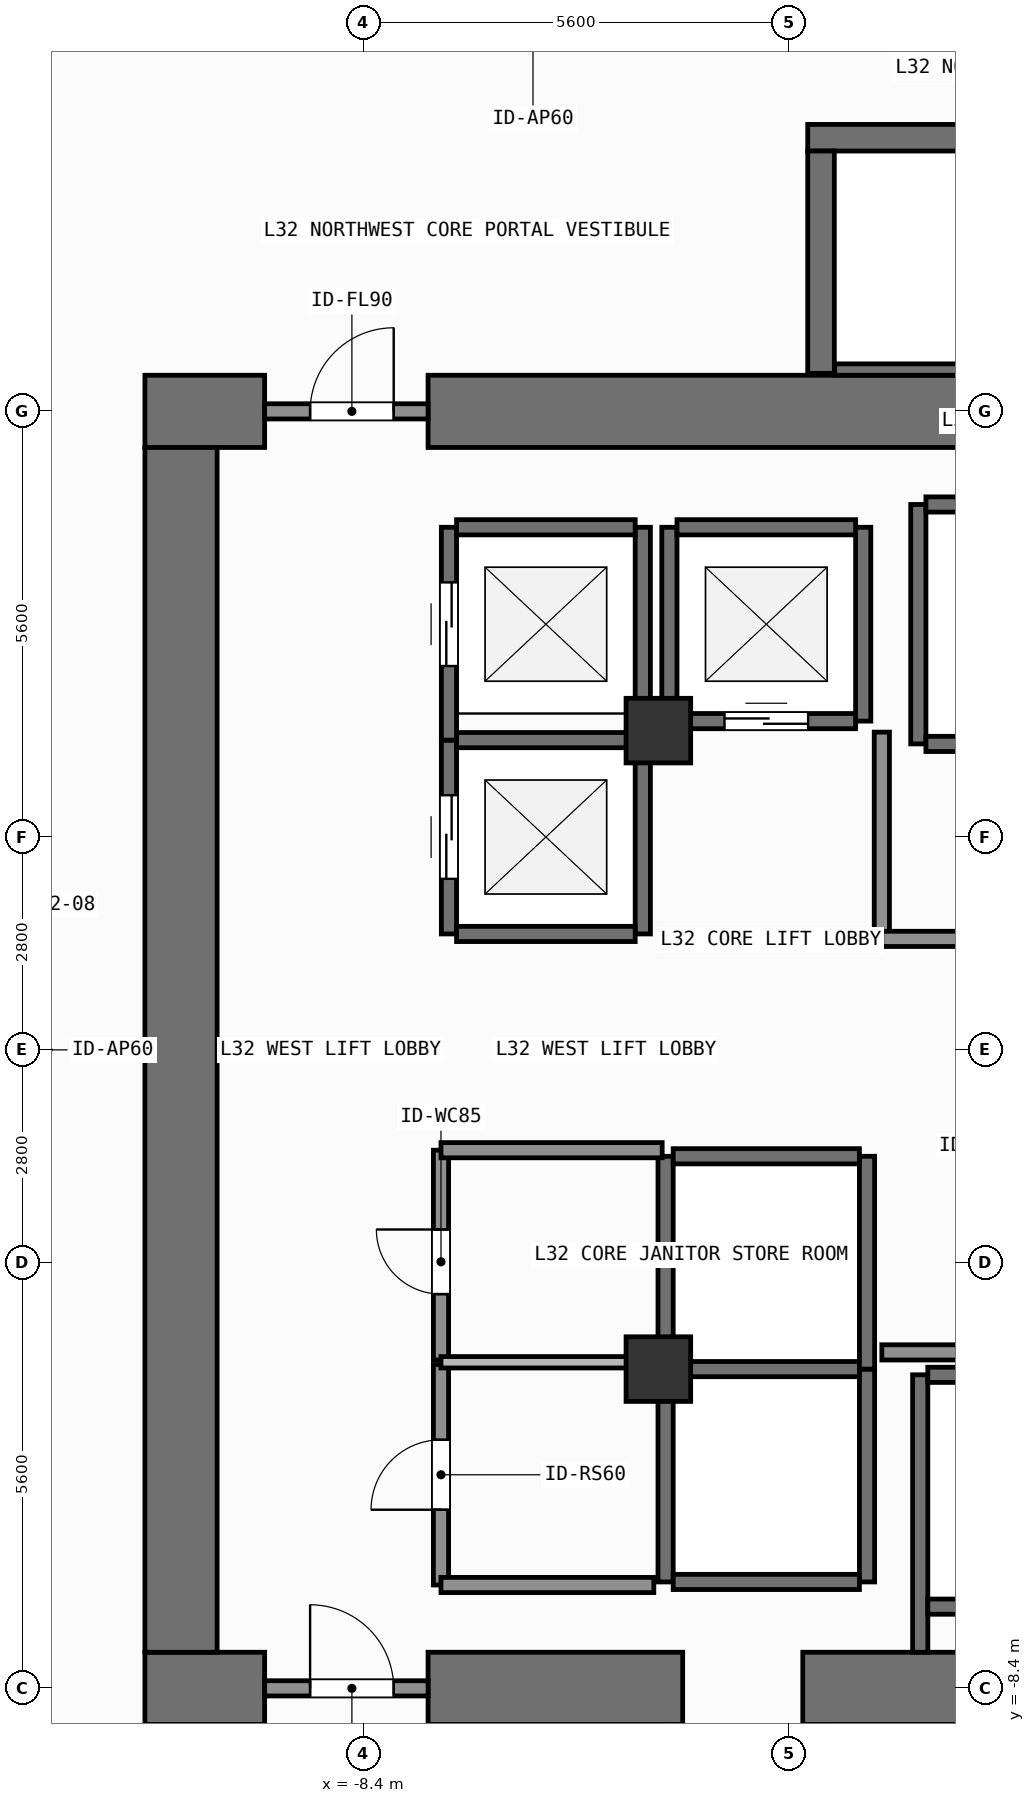
"""IFC4 building model, lengths in metres.
Left out: names, types, materials, properties, quantities, classifications, styles, units other than length and angle.
Written with IfcOpenShell. Run it as: python <this file> out.ifc"""

import sys

from ifc_helpers import new_model, si_unit, direction, frame, frame_2d, origin, origin_2d, place, context, subcontext, project, spatial, rectangle, extrude, element, fill, save


model = new_model("IFC4")
c1 = context("Model", 3, precision=1e-05, world=origin(), true_north=direction((0.0, 1.0)))
c2 = subcontext(c1, "Body", "Model", "MODEL_VIEW")
j1 = project(units=[si_unit("LENGTHUNIT", "METRE"), si_unit("PLANEANGLEUNIT", "RADIAN")], contexts=[c1])
p1 = place(None, origin())
s1 = spatial("IfcSite", under=j1, at=p1, CompositionType="ELEMENT")
p2 = place(p1, origin())
s2 = spatial("IfcBuilding", under=s1, at=p2, CompositionType="ELEMENT")
p3 = place(p2, frame((0.0, 0.0, 129.0)))
s3 = spatial("IfcBuildingStorey", under=s2, at=p3, CompositionType="ELEMENT", Elevation=129.0)
p4 = place(p3, frame((-11.275, -8.4, 0.0), z_axis=(0.0, 0.0, 1.0), x_axis=(1.0, 0.0, 0.0)))
e1 = element("IfcWall", 1, at=p4, inside=s3, PredefinedType="SHEAR", context=c2, shape_type="SweptSolid", body=[
    extrude(rectangle(XDim=1.575, YDim=0.95, at=frame_2d((0.788, 0.0))), origin(), (0.0, 0.0, 1.0), 3.9),
])
p5 = place(p3, frame((-7.55, -8.4, 0.0), z_axis=(0.0, 0.0, 1.0), x_axis=(1.0, 0.0, 0.0)))
e2 = element("IfcWall", 2, at=p5, inside=s3, PredefinedType="SHEAR", context=c2, shape_type="SweptSolid", body=[
    extrude(rectangle(XDim=3.35, YDim=0.95, at=frame_2d((1.675, 0.0))), origin(), (0.0, 0.0, 1.0), 3.9),
])
p6 = place(p3, frame((-2.62, -8.4, 0.0), z_axis=(0.0, 0.0, 1.0), x_axis=(1.0, 0.0, 0.0)))
e3 = element("IfcWall", 3, at=p6, inside=s3, PredefinedType="SHEAR", context=c2, shape_type="SweptSolid", body=[
    extrude(rectangle(XDim=7.27, YDim=0.95, at=frame_2d((3.635, 0.0))), origin(), (0.0, 0.0, 1.0), 3.9),
])
p7 = place(p3, frame((-11.275, 8.4, 0.0), z_axis=(0.0, 0.0, 1.0), x_axis=(1.0, 0.0, 0.0)))
e4 = element("IfcWall", 4, at=p7, inside=s3, PredefinedType="SHEAR", context=c2, shape_type="SweptSolid", body=[
    extrude(rectangle(XDim=1.575, YDim=0.95, at=frame_2d((0.788, 0.0))), origin(), (0.0, 0.0, 1.0), 3.9),
])
p8 = place(p3, frame((-7.55, 8.4, 0.0), z_axis=(0.0, 0.0, 1.0), x_axis=(1.0, 0.0, 0.0)))
e5 = element("IfcWall", 5, at=p8, inside=s3, PredefinedType="SHEAR", context=c2, shape_type="SweptSolid", body=[
    extrude(rectangle(XDim=16.425, YDim=0.95, at=frame_2d((8.212, 0.0))), origin(), (0.0, 0.0, 1.0), 3.9),
])
p9 = place(p3, frame((-10.8, -7.925, 0.0), z_axis=(0.0, 0.0, 1.0), x_axis=(0.0, 1.0, 0.0)))
e6 = element("IfcWall", 6, at=p9, inside=s3, PredefinedType="SHEAR", context=c2, shape_type="SweptSolid", body=[
    extrude(rectangle(XDim=15.85, YDim=0.95, at=frame_2d((7.925, 0.0))), origin(), (0.0, 0.0, 1.0), 3.9),
])
p10 = place(p3, frame((-2.555, 12.0, 0.0), z_axis=(0.0, 0.0, 1.0), x_axis=(1.0, 0.0, 0.0)))
e7 = element("IfcWall", 7, at=p10, inside=s3, PredefinedType="SHEAR", context=c2, shape_type="SweptSolid", body=[
    extrude(rectangle(XDim=7.31, YDim=0.35, at=frame_2d((3.655, 0.0))), origin(), (0.0, 0.0, 1.0), 3.9),
])
p11 = place(p3, frame((-2.2, 8.95, 0.0), z_axis=(0.0, 0.0, 1.0), x_axis=(1.0, 0.0, 0.0)))
e8 = element("IfcWall", 8, at=p11, inside=s3, PredefinedType="SHEAR", context=c2, shape_type="SweptSolid", body=[
    extrude(rectangle(XDim=6.6, YDim=0.15, at=frame_2d((3.3, 0.0))), origin(), (0.0, 0.0, 1.0), 3.9),
])
p12 = place(p3, frame((-2.38, 8.9, 0.0), z_axis=(0.0, 0.0, 1.0), x_axis=(0.0, 1.0, 0.0)))
e9 = element("IfcWall", 9, at=p12, inside=s3, PredefinedType="SHEAR", context=c2, shape_type="SweptSolid", body=[
    extrude(rectangle(XDim=2.925, YDim=0.35, at=frame_2d((1.462, 0.0))), origin(), (0.0, 0.0, 1.0), 3.9),
])
for number, where, z_axis, x_axis in (
    (10, (-4.52, -4.2, 0.0), (0.0, 0.0, 1.0), (1.0, 0.0, 0.0)),
    (11, (-4.52, 4.2, 0.0), (0.0, 0.0, 1.0), (1.0, 0.0, 0.0)),
):
    element("IfcColumn", number, at=place(p3, frame(where, z_axis=z_axis, x_axis=x_axis)), inside=s3, PredefinedType="COLUMN", context=c2, shape_type="SweptSolid", body=[
        extrude(rectangle(XDim=0.85, YDim=0.85, at=origin_2d()), origin(), (0.0, 0.0, 1.0), 3.9),
    ])
p13 = place(p3, frame((-7.275, 1.525, 0.0), z_axis=(0.0, 0.0, 1.0), x_axis=(0.0, 1.0, 0.0)))
e12 = element("IfcWall", 12, at=p13, inside=s3, PredefinedType="SHEAR", context=c2, shape_type="SweptSolid", body=[
    extrude(rectangle(XDim=2.55, YDim=0.2, at=frame_2d((1.275, 0.0))), origin(), (0.0, 0.0, 1.0), 3.68),
])
p14 = place(p13, frame((0.725, 0.0, 0.0)))
e13 = element("IfcOpeningElement", 13, at=p14, cuts=e12, PredefinedType="OPENING", context=c2, shape_type="SweptSolid", body=[
    extrude(rectangle(XDim=1.1, YDim=2.2, at=frame_2d((0.55, 1.1))), frame((0.0, 0.11, 0.0), z_axis=(0.0, -1.0, 0.0), x_axis=(1.0, 0.0, 0.0)), (0.0, 0.0, 1.0), 0.22),
])
p15 = place(p3, frame((-4.725, 1.525, 0.0), z_axis=(0.0, 0.0, 1.0), x_axis=(0.0, 1.0, 0.0)))
e14 = element("IfcWall", 14, at=p15, inside=s3, PredefinedType="SHEAR", context=c2, shape_type="SweptSolid", body=[
    extrude(rectangle(XDim=2.55, YDim=0.2, at=frame_2d((1.275, 0.0))), origin(), (0.0, 0.0, 1.0), 3.68),
])
for number, where, z_axis, x_axis in (
    (15, (-7.175, 1.525, 0.0), (0.0, 0.0, 1.0), (1.0, 0.0, 0.0)),
    (16, (-7.175, 4.075, 0.0), (0.0, 0.0, 1.0), (1.0, 0.0, 0.0)),
):
    element("IfcWall", number, at=place(p3, frame(where, z_axis=z_axis, x_axis=x_axis)), inside=s3, PredefinedType="SHEAR", context=c2, shape_type="SweptSolid", body=[
        extrude(rectangle(XDim=2.35, YDim=0.2, at=frame_2d((1.175, 0.0))), origin(), (0.0, 0.0, 1.0), 3.68),
    ])
p16 = place(p3, frame((-7.275, 4.075, 0.0), z_axis=(0.0, 0.0, 1.0), x_axis=(0.0, 1.0, 0.0)))
e17 = element("IfcWall", 17, at=p16, inside=s3, PredefinedType="SHEAR", context=c2, shape_type="SweptSolid", body=[
    extrude(rectangle(XDim=2.8, YDim=0.2, at=frame_2d((1.4, 0.0))), origin(), (0.0, 0.0, 1.0), 3.68),
])
p17 = place(p16, frame((0.975, 0.0, 0.0)))
e18 = element("IfcOpeningElement", 18, at=p17, cuts=e17, PredefinedType="OPENING", context=c2, shape_type="SweptSolid", body=[
    extrude(rectangle(XDim=1.1, YDim=2.2, at=frame_2d((0.55, 1.1))), frame((0.0, 0.11, 0.0), z_axis=(0.0, -1.0, 0.0), x_axis=(1.0, 0.0, 0.0)), (0.0, 0.0, 1.0), 0.22),
])
p18 = place(p3, frame((-4.725, 4.075, 0.0), z_axis=(0.0, 0.0, 1.0), x_axis=(0.0, 1.0, 0.0)))
e19 = element("IfcWall", 19, at=p18, inside=s3, PredefinedType="SHEAR", context=c2, shape_type="SweptSolid", body=[
    extrude(rectangle(XDim=2.8, YDim=0.2, at=frame_2d((1.4, 0.0))), origin(), (0.0, 0.0, 1.0), 3.68),
])
p19 = place(p3, frame((-7.175, 6.875, 0.0), z_axis=(0.0, 0.0, 1.0), x_axis=(1.0, 0.0, 0.0)))
e20 = element("IfcWall", 20, at=p19, inside=s3, PredefinedType="SHEAR", context=c2, shape_type="SweptSolid", body=[
    extrude(rectangle(XDim=2.35, YDim=0.2, at=frame_2d((1.175, 0.0))), origin(), (0.0, 0.0, 1.0), 3.68),
])
for number, where, z_axis, x_axis in (
    (21, (-4.375, 4.325, 0.0), (0.0, 0.0, 1.0), (0.0, 1.0, 0.0)),
    (22, (-1.825, 4.325, 0.0), (0.0, 0.0, 1.0), (0.0, 1.0, 0.0)),
):
    element("IfcWall", number, at=place(p3, frame(where, z_axis=z_axis, x_axis=x_axis)), inside=s3, PredefinedType="SHEAR", context=c2, shape_type="SweptSolid", body=[
        extrude(rectangle(XDim=2.55, YDim=0.2, at=frame_2d((1.275, 0.0))), origin(), (0.0, 0.0, 1.0), 3.68),
    ])
p20 = place(p3, frame((-4.275, 4.325, 0.0), z_axis=(0.0, 0.0, 1.0), x_axis=(1.0, 0.0, 0.0)))
e23 = element("IfcWall", 23, at=p20, inside=s3, PredefinedType="SHEAR", context=c2, shape_type="SweptSolid", body=[
    extrude(rectangle(XDim=2.35, YDim=0.2, at=frame_2d((1.175, 0.0))), origin(), (0.0, 0.0, 1.0), 3.68),
])
p21 = place(p20, frame((0.625, 0.0, 0.0)))
e24 = element("IfcOpeningElement", 24, at=p21, cuts=e23, PredefinedType="OPENING", context=c2, shape_type="SweptSolid", body=[
    extrude(rectangle(XDim=1.1, YDim=2.2, at=frame_2d((0.55, 1.1))), frame((0.0, 0.11, 0.0), z_axis=(0.0, -1.0, 0.0), x_axis=(1.0, 0.0, 0.0)), (0.0, 0.0, 1.0), 0.22),
])
p22 = place(p3, frame((-4.275, 6.875, 0.0), z_axis=(0.0, 0.0, 1.0), x_axis=(1.0, 0.0, 0.0)))
e25 = element("IfcWall", 25, at=p22, inside=s3, PredefinedType="SHEAR", context=c2, shape_type="SweptSolid", body=[
    extrude(rectangle(XDim=2.35, YDim=0.2, at=frame_2d((1.175, 0.0))), origin(), (0.0, 0.0, 1.0), 3.68),
])
for number, where, z_axis, x_axis in (
    (26, (-4.425, -7.0, 0.0), (0.0, 0.0, 1.0), (0.0, 1.0, 0.0)),
    (27, (-1.775, -7.0, 0.0), (0.0, 0.0, 1.0), (0.0, 1.0, 0.0)),
):
    element("IfcWall", number, at=place(p3, frame(where, z_axis=z_axis, x_axis=x_axis)), inside=s3, PredefinedType="SHEAR", context=c2, shape_type="SweptSolid", body=[
        extrude(rectangle(XDim=2.8, YDim=0.2, at=frame_2d((1.4, 0.0))), origin(), (0.0, 0.0, 1.0), 3.68),
    ])
for number, where, z_axis, x_axis in (
    (28, (-4.325, -7.0, 0.0), (0.0, 0.0, 1.0), (1.0, 0.0, 0.0)),
    (29, (-4.325, -4.2, 0.0), (0.0, 0.0, 1.0), (1.0, 0.0, 0.0)),
):
    element("IfcWall", number, at=place(p3, frame(where, z_axis=z_axis, x_axis=x_axis)), inside=s3, PredefinedType="SHEAR", context=c2, shape_type="SweptSolid", body=[
        extrude(rectangle(XDim=2.45, YDim=0.2, at=frame_2d((1.225, 0.0))), origin(), (0.0, 0.0, 1.0), 3.68),
    ])
for number, where, z_axis, x_axis in (
    (30, (-4.425, -4.2, 0.0), (0.0, 0.0, 1.0), (0.0, 1.0, 0.0)),
    (31, (-1.775, -4.2, 0.0), (0.0, 0.0, 1.0), (0.0, 1.0, 0.0)),
):
    element("IfcWall", number, at=place(p3, frame(where, z_axis=z_axis, x_axis=x_axis)), inside=s3, PredefinedType="SHEAR", context=c2, shape_type="SweptSolid", body=[
        extrude(rectangle(XDim=2.8, YDim=0.2, at=frame_2d((1.4, 0.0))), origin(), (0.0, 0.0, 1.0), 3.68),
    ])
p23 = place(p3, frame((-4.325, -1.4, 0.0), z_axis=(0.0, 0.0, 1.0), x_axis=(1.0, 0.0, 0.0)))
e32 = element("IfcWall", 32, at=p23, inside=s3, PredefinedType="SHEAR", context=c2, shape_type="SweptSolid", body=[
    extrude(rectangle(XDim=2.45, YDim=0.2, at=frame_2d((1.225, 0.0))), origin(), (0.0, 0.0, 1.0), 3.68),
])
p24 = place(p3, frame((-1.1, 4.025, 0.0), z_axis=(0.0, 0.0, 1.0), x_axis=(0.0, 1.0, 0.0)))
e33 = element("IfcWall", 33, at=p24, inside=s3, PredefinedType="SHEAR", context=c2, shape_type="SweptSolid", body=[
    extrude(rectangle(XDim=3.15, YDim=0.2, at=frame_2d((1.575, 0.0))), origin(), (0.0, 0.0, 1.0), 3.68),
])
for number, where, z_axis, x_axis in (
    (34, (-1.0, 4.025, 0.0), (0.0, 0.0, 1.0), (1.0, 0.0, 0.0)),
    (35, (-1.0, 7.175, 0.0), (0.0, 0.0, 1.0), (1.0, 0.0, 0.0)),
):
    element("IfcWall", number, at=place(p3, frame(where, z_axis=z_axis, x_axis=x_axis)), inside=s3, PredefinedType="SHEAR", context=c2, shape_type="SweptSolid", body=[
        extrude(rectangle(XDim=2.4, YDim=0.2, at=frame_2d((1.2, 0.0))), origin(), (0.0, 0.0, 1.0), 3.68),
    ])
p25 = place(p3, frame((-1.075, -7.925, 0.0), z_axis=(0.0, 0.0, 1.0), x_axis=(0.0, 1.0, 0.0)))
e36 = element("IfcWall", 36, at=p25, inside=s3, PredefinedType="SHEAR", context=c2, shape_type="SweptSolid", body=[
    extrude(rectangle(XDim=3.65, YDim=0.2, at=frame_2d((1.825, 0.0))), origin(), (0.0, 0.0, 1.0), 3.68),
])
for number, where, z_axis, x_axis in (
    (37, (-0.975, -7.325, 0.0), (0.0, 0.0, 1.0), (1.0, 0.0, 0.0)),
    (38, (-0.975, -4.275, 0.0), (0.0, 0.0, 1.0), (1.0, 0.0, 0.0)),
):
    element("IfcWall", number, at=place(p3, frame(where, z_axis=z_axis, x_axis=x_axis)), inside=s3, PredefinedType="SHEAR", context=c2, shape_type="SweptSolid", body=[
        extrude(rectangle(XDim=2.35, YDim=0.2, at=frame_2d((1.175, 0.0))), origin(), (0.0, 0.0, 1.0), 3.68),
    ])
p26 = place(p3, frame((-9.7, -8.4, 0.0), z_axis=(0.0, 0.0, 1.0), x_axis=(1.0, 0.0, 0.0)))
e39 = element("IfcWall", 39, at=p26, inside=s3, PredefinedType="SOLIDWALL", context=c2, shape_type="SweptSolid", body=[
    extrude(rectangle(XDim=2.15, YDim=0.2, at=frame_2d((1.075, 0.0))), origin(), (0.0, 0.0, 1.0), 2.72),
])
p27 = place(p26, frame((0.598, 0.0, 0.0)))
e40 = element("IfcOpeningElement", 40, at=p27, cuts=e39, PredefinedType="OPENING", context=c2, shape_type="SweptSolid", body=[
    extrude(rectangle(XDim=1.1, YDim=2.15, at=frame_2d((0.55, 1.075))), frame((0.0, 0.11, 0.0), z_axis=(0.0, -1.0, 0.0), x_axis=(1.0, 0.0, 0.0)), (0.0, 0.0, 1.0), 0.22),
])
p28 = place(p3, frame((-9.7, 8.4, 0.0), z_axis=(0.0, 0.0, 1.0), x_axis=(1.0, 0.0, 0.0)))
e41 = element("IfcWall", 41, at=p28, inside=s3, PredefinedType="SOLIDWALL", context=c2, shape_type="SweptSolid", body=[
    extrude(rectangle(XDim=2.15, YDim=0.2, at=frame_2d((1.075, 0.0))), origin(), (0.0, 0.0, 1.0), 2.72),
])
p29 = place(p28, frame((0.598, 0.0, 0.0)))
e42 = element("IfcOpeningElement", 42, at=p29, cuts=e41, PredefinedType="OPENING", context=c2, shape_type="SweptSolid", body=[
    extrude(rectangle(XDim=1.1, YDim=2.15, at=frame_2d((0.55, 1.075))), frame((0.0, 0.11, 0.0), z_axis=(0.0, -1.0, 0.0), x_axis=(1.0, 0.0, 0.0)), (0.0, 0.0, 1.0), 0.22),
])
p30 = place(p3, frame((-7.38, -7.04, 0.0), z_axis=(0.0, 0.0, 1.0), x_axis=(0.0, 1.0, 0.0)))
e43 = element("IfcWall", 43, at=p30, inside=s3, PredefinedType="SOLIDWALL", context=c2, shape_type="SweptSolid", body=[
    extrude(rectangle(XDim=2.9, YDim=0.2, at=frame_2d((1.45, 0.0))), origin(), (0.0, 0.0, 1.0), 3.68),
])
p31 = place(p30, frame((0.99, 0.0, 0.0)))
e44 = element("IfcOpeningElement", 44, at=p31, cuts=e43, PredefinedType="OPENING", context=c2, shape_type="SweptSolid", body=[
    extrude(rectangle(XDim=0.92, YDim=2.1, at=frame_2d((0.46, 1.05))), frame((0.0, 0.11, 0.0), z_axis=(0.0, -1.0, 0.0), x_axis=(1.0, 0.0, 0.0)), (0.0, 0.0, 1.0), 0.22),
])
p32 = place(p3, frame((-7.38, -4.08, 0.0), z_axis=(0.0, 0.0, 1.0), x_axis=(0.0, 1.0, 0.0)))
e45 = element("IfcWall", 45, at=p32, inside=s3, PredefinedType="SOLIDWALL", context=c2, shape_type="SweptSolid", body=[
    extrude(rectangle(XDim=2.76, YDim=0.2, at=frame_2d((1.38, 0.0))), origin(), (0.0, 0.0, 1.0), 3.68),
])
p33 = place(p32, frame((0.867, 0.0, 0.0)))
e46 = element("IfcOpeningElement", 46, at=p33, cuts=e45, PredefinedType="OPENING", context=c2, shape_type="SweptSolid", body=[
    extrude(rectangle(XDim=0.85, YDim=2.1, at=frame_2d((0.425, 1.05))), frame((0.0, 0.11, 0.0), z_axis=(0.0, -1.0, 0.0), x_axis=(1.0, 0.0, 0.0)), (0.0, 0.0, 1.0), 0.22),
])
p34 = place(p3, frame((-7.38, -1.32, 0.0), z_axis=(0.0, 0.0, 1.0), x_axis=(1.0, 0.0, 0.0)))
e47 = element("IfcWall", 47, at=p34, inside=s3, PredefinedType="SOLIDWALL", context=c2, shape_type="SweptSolid", body=[
    extrude(rectangle(XDim=2.91, YDim=0.2, at=frame_2d((1.455, 0.0))), origin(), (0.0, 0.0, 1.0), 3.68),
])
p35 = place(p3, frame((-1.58, 1.48, 0.0), z_axis=(0.0, 0.0, 1.0), x_axis=(0.0, 1.0, 0.0)))
e48 = element("IfcWall", 48, at=p35, inside=s3, PredefinedType="SOLIDWALL", context=c2, shape_type="SweptSolid", body=[
    extrude(rectangle(XDim=2.7, YDim=0.2, at=frame_2d((1.35, 0.0))), origin(), (0.0, 0.0, 1.0), 3.68),
])
for number, where, z_axis, x_axis in (
    (49, (-1.58, -3.98, 0.0), (0.0, 0.0, 1.0), (1.0, 0.0, 0.0)),
    (50, (-1.58, 1.46, 0.0), (0.0, 0.0, 1.0), (1.0, 0.0, 0.0)),
):
    element("IfcWall", number, at=place(p3, frame(where, z_axis=z_axis, x_axis=x_axis)), inside=s3, PredefinedType="SOLIDWALL", context=c2, shape_type="SweptSolid", body=[
        extrude(rectangle(XDim=3.19, YDim=0.2, at=frame_2d((1.595, 0.0))), origin(), (0.0, 0.0, 1.0), 3.68),
    ])
p36 = place(p3, frame((-7.38, -7.04, 0.0), z_axis=(0.0, 0.0, 1.0), x_axis=(1.0, 0.0, 0.0)))
e51 = element("IfcWall", 51, at=p36, inside=s3, PredefinedType="SOLIDWALL", context=c2, shape_type="SweptSolid", body=[
    extrude(rectangle(XDim=2.8, YDim=0.2, at=frame_2d((1.4, 0.0))), origin(), (0.0, 0.0, 1.0), 3.68),
])
p37 = place(p3, frame((-7.38, -4.11, 0.0), z_axis=(0.0, 0.0, 1.0), x_axis=(1.0, 0.0, 0.0)))
e52 = element("IfcWall", 52, at=p37, inside=s3, PredefinedType="PARTITIONING", context=c2, shape_type="SweptSolid", body=[
    extrude(rectangle(XDim=2.8, YDim=0.15, at=frame_2d((1.4, 0.0))), origin(), (0.0, 0.0, 1.0), 3.68),
])
p38 = place(p14, origin())
e53 = element("IfcDoor", 53, at=p38, inside=s3, OperationType="SLIDING_TO_LEFT", PredefinedType="DOOR", context=c2, shape_type="SweptSolid", body=[
    extrude(rectangle(XDim=1.1, YDim=2.2, at=frame_2d((0.55, 1.1))), frame((0.0, 0.025, 0.0), z_axis=(0.0, -1.0, 0.0), x_axis=(1.0, 0.0, 0.0)), (0.0, 0.0, 1.0), 0.05),
])
fill(e13, e53)
p39 = place(p17, origin())
e54 = element("IfcDoor", 54, at=p39, inside=s3, OperationType="SLIDING_TO_LEFT", PredefinedType="DOOR", context=c2, shape_type="SweptSolid", body=[
    extrude(rectangle(XDim=1.1, YDim=2.2, at=frame_2d((0.55, 1.1))), frame((0.0, 0.025, 0.0), z_axis=(0.0, -1.0, 0.0), x_axis=(1.0, 0.0, 0.0)), (0.0, 0.0, 1.0), 0.05),
])
fill(e18, e54)
p40 = place(p21, origin())
e55 = element("IfcDoor", 55, at=p40, inside=s3, OperationType="SLIDING_TO_LEFT", PredefinedType="DOOR", context=c2, shape_type="SweptSolid", body=[
    extrude(rectangle(XDim=1.1, YDim=2.2, at=frame_2d((0.55, 1.1))), frame((0.0, 0.025, 0.0), z_axis=(0.0, -1.0, 0.0), x_axis=(1.0, 0.0, 0.0)), (0.0, 0.0, 1.0), 0.05),
])
fill(e24, e55)
p41 = place(p27, origin())
e56 = element("IfcDoor", 56, at=p41, inside=s3, OperationType="SINGLE_SWING_LEFT", PredefinedType="DOOR", context=c2, shape_type="SweptSolid", body=[
    extrude(rectangle(XDim=1.1, YDim=2.15, at=frame_2d((0.55, 1.075))), frame((0.0, 0.025, 0.0), z_axis=(0.0, -1.0, 0.0), x_axis=(1.0, 0.0, 0.0)), (0.0, 0.0, 1.0), 0.05),
])
fill(e40, e56)
p42 = place(p29, origin())
e57 = element("IfcDoor", 57, at=p42, inside=s3, OperationType="SINGLE_SWING_RIGHT", PredefinedType="DOOR", context=c2, shape_type="SweptSolid", body=[
    extrude(rectangle(XDim=1.1, YDim=2.15, at=frame_2d((0.55, 1.075))), frame((0.0, 0.025, 0.0), z_axis=(0.0, -1.0, 0.0), x_axis=(1.0, 0.0, 0.0)), (0.0, 0.0, 1.0), 0.05),
])
fill(e42, e57)
p43 = place(p31, origin())
e58 = element("IfcDoor", 58, at=p43, inside=s3, OperationType="SINGLE_SWING_LEFT", PredefinedType="DOOR", context=c2, shape_type="SweptSolid", body=[
    extrude(rectangle(XDim=0.92, YDim=2.1, at=frame_2d((0.46, 1.05))), frame((0.0, 0.025, 0.0), z_axis=(0.0, -1.0, 0.0), x_axis=(1.0, 0.0, 0.0)), (0.0, 0.0, 1.0), 0.05),
])
fill(e44, e58)
p44 = place(p33, origin())
e59 = element("IfcDoor", 59, at=p44, inside=s3, OperationType="SINGLE_SWING_RIGHT", PredefinedType="DOOR", context=c2, shape_type="SweptSolid", body=[
    extrude(rectangle(XDim=0.85, YDim=2.1, at=frame_2d((0.425, 1.05))), frame((0.0, 0.025, 0.0), z_axis=(0.0, -1.0, 0.0), x_axis=(1.0, 0.0, 0.0)), (0.0, 0.0, 1.0), 0.05),
])
fill(e46, e59)
save(model, sys.argv[1])
